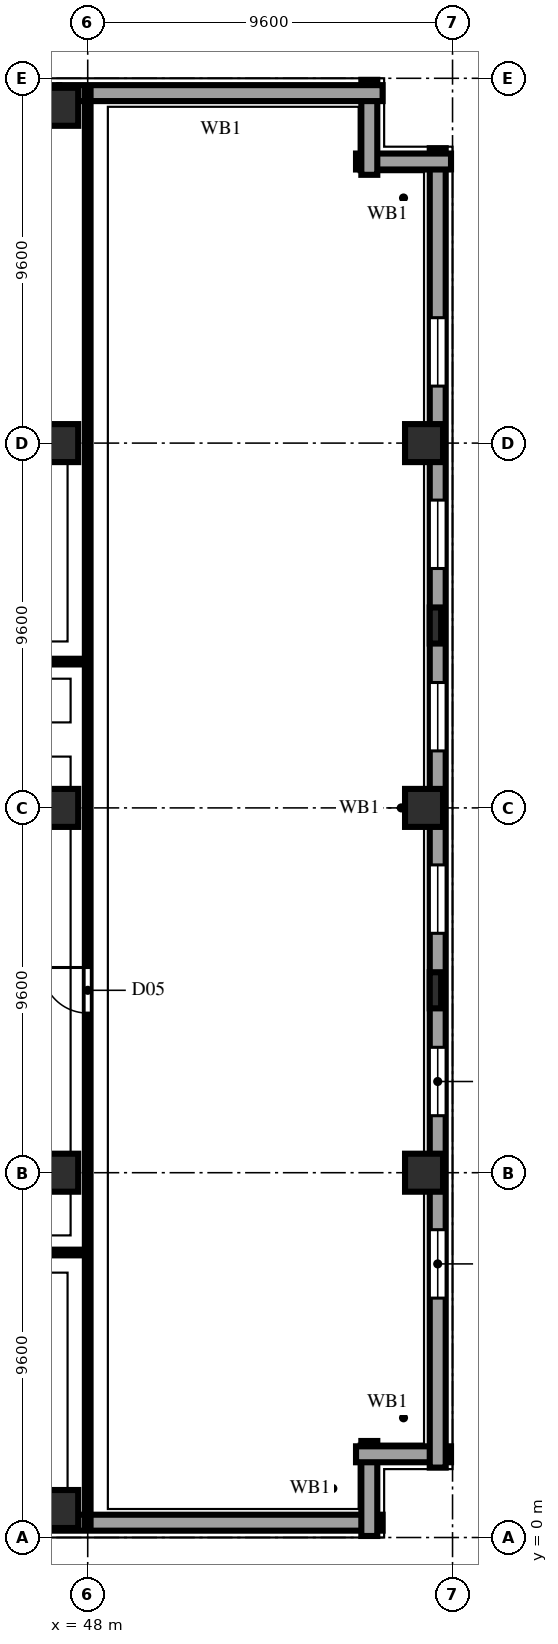
"""IFC4 building model, lengths in metres.
Left out: names, types, materials, properties, quantities, classifications, styles, units other than length and angle.
Written with IfcOpenShell. Run it as: python <this file> out.ifc"""

import sys

from ifc_helpers import new_model, si_unit, direction, frame, frame_2d, origin, origin_2d, place, context, subcontext, project, spatial, rectangle, extrude, element, fill, save


model = new_model("IFC4")
c1 = context("Model", 3, precision=1e-05, world=origin(), true_north=direction((0.0, 1.0)))
c2 = subcontext(c1, "Body", "Model", "MODEL_VIEW")
j1 = project(units=[si_unit("LENGTHUNIT", "METRE"), si_unit("PLANEANGLEUNIT", "RADIAN")], contexts=[c1])
p1 = place(None, origin())
s1 = spatial("IfcSite", under=j1, at=p1, CompositionType="ELEMENT")
p2 = place(p1, origin())
s2 = spatial("IfcBuilding", under=s1, at=p2, CompositionType="ELEMENT")
p3 = place(p2, frame((0.0, 0.0, 116.6)))
s3 = spatial("IfcBuildingStorey", under=s2, at=p3, CompositionType="ELEMENT", Elevation=116.6)
for number, where, z_axis, x_axis in (
    (1, (47.25, 0.75, 0.0), (0.0, 0.0, 1.0), (1.0, 0.0, 0.0)),
    (2, (47.25, 9.6, 0.0), (0.0, 0.0, 1.0), (1.0, 0.0, 0.0)),
    (3, (47.25, 19.2, 0.0), (0.0, 0.0, 1.0), (1.0, 0.0, 0.0)),
    (4, (47.25, 28.8, 0.0), (0.0, 0.0, 1.0), (1.0, 0.0, 0.0)),
    (5, (47.25, 37.65, 0.0), (0.0, 0.0, 1.0), (1.0, 0.0, 0.0)),
    (6, (56.85, 9.6, 0.0), (0.0, 0.0, 1.0), (1.0, 0.0, 0.0)),
    (7, (56.85, 19.2, 0.0), (0.0, 0.0, 1.0), (1.0, 0.0, 0.0)),
    (8, (56.85, 28.8, 0.0), (0.0, 0.0, 1.0), (1.0, 0.0, 0.0)),
):
    element("IfcColumn", number, at=place(p3, frame(where, z_axis=z_axis, x_axis=x_axis)), inside=s3, PredefinedType="COLUMN", context=c2, shape_type="SweptSolid", body=[
        extrude(rectangle(XDim=1.0, YDim=1.0, at=origin_2d()), origin(), (0.0, 0.0, 1.0), 3.8),
    ])
for number, where, z_axis, x_axis in (
    (9, (57.15, 14.4, 0.0), (0.0, 0.0, 1.0), (0.0, 1.0, 0.0)),
    (10, (57.15, 24.0, 0.0), (0.0, 0.0, 1.0), (0.0, 1.0, 0.0)),
):
    element("IfcColumn", number, at=place(p3, frame(where, z_axis=z_axis, x_axis=x_axis)), inside=s3, PredefinedType="PILASTER", context=c2, shape_type="SweptSolid", body=[
        extrude(rectangle(XDim=0.95, YDim=0.3, at=origin_2d()), origin(), (0.0, 0.0, 1.0), 3.8),
    ])
p4 = place(p3, frame((1.84, 0.39, 0.0), z_axis=(0.0, 0.0, 1.0), x_axis=(1.0, 0.0, 0.0)))
e11 = element("IfcWall", 11, at=p4, inside=s3, PredefinedType="SOLIDWALL", context=c2, shape_type="SweptSolid", body=[
    extrude(rectangle(XDim=53.92, YDim=0.42, at=frame_2d((26.96, 0.0))), origin(), (0.0, 0.0, 1.0), 3.54),
])
p5 = place(p4, frame((4.16, 0.0, 0.85)))
e12 = element("IfcOpeningElement", 12, at=p5, cuts=e11, PredefinedType="OPENING", context=c2, shape_type="SweptSolid", body=[
    extrude(rectangle(XDim=2.4, YDim=1.85, at=frame_2d((1.2, 0.925))), frame((0.0, 0.222, 0.0), z_axis=(0.0, -1.0, 0.0), x_axis=(1.0, 0.0, 0.0)), (0.0, 0.0, 1.0), 0.444),
])
p6 = place(p4, frame((8.96, 0.0, 0.85)))
e13 = element("IfcOpeningElement", 13, at=p6, cuts=e11, PredefinedType="OPENING", context=c2, shape_type="SweptSolid", body=[
    extrude(rectangle(XDim=2.4, YDim=1.85, at=frame_2d((1.2, 0.925))), frame((0.0, 0.222, 0.0), z_axis=(0.0, -1.0, 0.0), x_axis=(1.0, 0.0, 0.0)), (0.0, 0.0, 1.0), 0.444),
])
p7 = place(p4, frame((13.76, 0.0, 0.85)))
e14 = element("IfcOpeningElement", 14, at=p7, cuts=e11, PredefinedType="OPENING", context=c2, shape_type="SweptSolid", body=[
    extrude(rectangle(XDim=2.4, YDim=1.85, at=frame_2d((1.2, 0.925))), frame((0.0, 0.222, 0.0), z_axis=(0.0, -1.0, 0.0), x_axis=(1.0, 0.0, 0.0)), (0.0, 0.0, 1.0), 0.444),
])
p8 = place(p4, frame((18.56, 0.0, 0.85)))
e15 = element("IfcOpeningElement", 15, at=p8, cuts=e11, PredefinedType="OPENING", context=c2, shape_type="SweptSolid", body=[
    extrude(rectangle(XDim=2.4, YDim=1.85, at=frame_2d((1.2, 0.925))), frame((0.0, 0.222, 0.0), z_axis=(0.0, -1.0, 0.0), x_axis=(1.0, 0.0, 0.0)), (0.0, 0.0, 1.0), 0.444),
])
p9 = place(p4, frame((23.36, 0.0, 0.85)))
e16 = element("IfcOpeningElement", 16, at=p9, cuts=e11, PredefinedType="OPENING", context=c2, shape_type="SweptSolid", body=[
    extrude(rectangle(XDim=2.4, YDim=1.85, at=frame_2d((1.2, 0.925))), frame((0.0, 0.222, 0.0), z_axis=(0.0, -1.0, 0.0), x_axis=(1.0, 0.0, 0.0)), (0.0, 0.0, 1.0), 0.444),
])
p10 = place(p4, frame((28.16, 0.0, 0.85)))
e17 = element("IfcOpeningElement", 17, at=p10, cuts=e11, PredefinedType="OPENING", context=c2, shape_type="SweptSolid", body=[
    extrude(rectangle(XDim=2.4, YDim=1.85, at=frame_2d((1.2, 0.925))), frame((0.0, 0.222, 0.0), z_axis=(0.0, -1.0, 0.0), x_axis=(1.0, 0.0, 0.0)), (0.0, 0.0, 1.0), 0.444),
])
for number, where, z_axis, x_axis in (
    (18, (55.41, 0.04, 0.0), (0.0, 0.0, 1.0), (0.0, 1.0, 0.0)),
    (19, (55.06, 2.19, 0.0), (0.0, 0.0, 1.0), (1.0, 0.0, 0.0)),
):
    element("IfcWall", number, at=place(p3, frame(where, z_axis=z_axis, x_axis=x_axis)), inside=s3, PredefinedType="SOLIDWALL", context=c2, shape_type="SweptSolid", body=[
        extrude(rectangle(XDim=2.5, YDim=0.42, at=frame_2d((1.25, 0.0))), origin(), (0.0, 0.0, 1.0), 3.54),
    ])
p11 = place(p3, frame((57.21, 1.84, 0.0), z_axis=(0.0, 0.0, 1.0), x_axis=(0.0, 1.0, 0.0)))
e20 = element("IfcWall", 20, at=p11, inside=s3, PredefinedType="SOLIDWALL", context=c2, shape_type="SweptSolid", body=[
    extrude(rectangle(XDim=34.72, YDim=0.42, at=frame_2d((17.36, 0.0))), origin(), (0.0, 0.0, 1.0), 3.54),
])
p12 = place(p11, frame((4.46, 0.0, 0.85)))
e21 = element("IfcOpeningElement", 21, at=p12, cuts=e20, PredefinedType="OPENING", context=c2, shape_type="SweptSolid", body=[
    extrude(rectangle(XDim=1.8, YDim=1.85, at=frame_2d((0.9, 0.925))), frame((0.0, 0.222, 0.0), z_axis=(0.0, -1.0, 0.0), x_axis=(1.0, 0.0, 0.0)), (0.0, 0.0, 1.0), 0.444),
])
p13 = place(p11, frame((9.26, 0.0, 0.85)))
e22 = element("IfcOpeningElement", 22, at=p13, cuts=e20, PredefinedType="OPENING", context=c2, shape_type="SweptSolid", body=[
    extrude(rectangle(XDim=1.8, YDim=1.85, at=frame_2d((0.9, 0.925))), frame((0.0, 0.222, 0.0), z_axis=(0.0, -1.0, 0.0), x_axis=(1.0, 0.0, 0.0)), (0.0, 0.0, 1.0), 0.444),
])
p14 = place(p11, frame((14.06, 0.0, 0.85)))
e23 = element("IfcOpeningElement", 23, at=p14, cuts=e20, PredefinedType="OPENING", context=c2, shape_type="SweptSolid", body=[
    extrude(rectangle(XDim=1.8, YDim=1.85, at=frame_2d((0.9, 0.925))), frame((0.0, 0.222, 0.0), z_axis=(0.0, -1.0, 0.0), x_axis=(1.0, 0.0, 0.0)), (0.0, 0.0, 1.0), 0.444),
])
p15 = place(p11, frame((18.86, 0.0, 0.85)))
e24 = element("IfcOpeningElement", 24, at=p15, cuts=e20, PredefinedType="OPENING", context=c2, shape_type="SweptSolid", body=[
    extrude(rectangle(XDim=1.8, YDim=1.85, at=frame_2d((0.9, 0.925))), frame((0.0, 0.222, 0.0), z_axis=(0.0, -1.0, 0.0), x_axis=(1.0, 0.0, 0.0)), (0.0, 0.0, 1.0), 0.444),
])
p16 = place(p11, frame((23.66, 0.0, 0.85)))
e25 = element("IfcOpeningElement", 25, at=p16, cuts=e20, PredefinedType="OPENING", context=c2, shape_type="SweptSolid", body=[
    extrude(rectangle(XDim=1.8, YDim=1.85, at=frame_2d((0.9, 0.925))), frame((0.0, 0.222, 0.0), z_axis=(0.0, -1.0, 0.0), x_axis=(1.0, 0.0, 0.0)), (0.0, 0.0, 1.0), 0.444),
])
p17 = place(p11, frame((28.46, 0.0, 0.85)))
e26 = element("IfcOpeningElement", 26, at=p17, cuts=e20, PredefinedType="OPENING", context=c2, shape_type="SweptSolid", body=[
    extrude(rectangle(XDim=1.8, YDim=1.85, at=frame_2d((0.9, 0.925))), frame((0.0, 0.222, 0.0), z_axis=(0.0, -1.0, 0.0), x_axis=(1.0, 0.0, 0.0)), (0.0, 0.0, 1.0), 0.444),
])
for number, where, z_axis, x_axis in (
    (27, (57.56, 36.21, 0.0), (0.0, 0.0, 1.0), (-1.0, 0.0, 0.0)),
    (28, (55.41, 35.86, 0.0), (0.0, 0.0, 1.0), (0.0, 1.0, 0.0)),
):
    element("IfcWall", number, at=place(p3, frame(where, z_axis=z_axis, x_axis=x_axis)), inside=s3, PredefinedType="SOLIDWALL", context=c2, shape_type="SweptSolid", body=[
        extrude(rectangle(XDim=2.5, YDim=0.42, at=frame_2d((1.25, 0.0))), origin(), (0.0, 0.0, 1.0), 3.54),
    ])
p18 = place(p3, frame((55.76, 38.01, 0.0), z_axis=(0.0, 0.0, 1.0), x_axis=(-1.0, 0.0, 0.0)))
e29 = element("IfcWall", 29, at=p18, inside=s3, PredefinedType="SOLIDWALL", context=c2, shape_type="SweptSolid", body=[
    extrude(rectangle(XDim=8.51, YDim=0.42, at=frame_2d((4.255, 0.0))), origin(), (0.0, 0.0, 1.0), 3.54),
])
p19 = place(p3, frame((0.22, 7.5, 0.0), z_axis=(0.0, 0.0, 1.0), x_axis=(1.0, 0.0, 0.0)))
e30 = element("IfcWall", 30, at=p19, inside=s3, PredefinedType="PARTITIONING", context=c2, shape_type="SweptSolid", body=[
    extrude(rectangle(XDim=47.78, YDim=0.15, at=frame_2d((23.89, 0.0))), origin(), (0.0, 0.0, 1.0), 3.54),
])
p20 = place(p19, frame((13.68, 0.0, 0.0)))
e31 = element("IfcOpeningElement", 31, at=p20, cuts=e30, PredefinedType="OPENING", context=c2, shape_type="SweptSolid", body=[
    extrude(rectangle(XDim=1.0, YDim=2.2, at=frame_2d((0.5, 1.1))), frame((0.0, 0.087, 0.0), z_axis=(0.0, -1.0, 0.0), x_axis=(1.0, 0.0, 0.0)), (0.0, 0.0, 1.0), 0.174),
])
p21 = place(p19, frame((41.63, 0.0, 0.0)))
e32 = element("IfcOpeningElement", 32, at=p21, cuts=e30, PredefinedType="OPENING", context=c2, shape_type="SweptSolid", body=[
    extrude(rectangle(XDim=1.0, YDim=2.2, at=frame_2d((0.5, 1.1))), frame((0.0, 0.087, 0.0), z_axis=(0.0, -1.0, 0.0), x_axis=(1.0, 0.0, 0.0)), (0.0, 0.0, 1.0), 0.174),
])
p22 = place(p3, frame((48.0, 0.22, 0.0), z_axis=(0.0, 0.0, 1.0), x_axis=(0.0, 1.0, 0.0)))
e33 = element("IfcWall", 33, at=p22, inside=s3, PredefinedType="PARTITIONING", context=c2, shape_type="SweptSolid", body=[
    extrude(rectangle(XDim=37.96, YDim=0.15, at=frame_2d((18.98, 0.0))), origin(), (0.0, 0.0, 1.0), 3.54),
])
p23 = place(p22, frame((13.58, 0.0, 0.0)))
e34 = element("IfcOpeningElement", 34, at=p23, cuts=e33, PredefinedType="OPENING", context=c2, shape_type="SweptSolid", body=[
    extrude(rectangle(XDim=1.2, YDim=2.2, at=frame_2d((0.6, 1.1))), frame((0.0, 0.087, 0.0), z_axis=(0.0, -1.0, 0.0), x_axis=(1.0, 0.0, 0.0)), (0.0, 0.0, 1.0), 0.174),
])
p24 = place(p3, frame((38.4, 23.05, 0.0), z_axis=(0.0, 0.0, 1.0), x_axis=(1.0, 0.0, 0.0)))
e35 = element("IfcWall", 35, at=p24, inside=s3, PredefinedType="PARTITIONING", context=c2, shape_type="SweptSolid", body=[
    extrude(rectangle(XDim=9.52, YDim=0.15, at=frame_2d((4.76, 0.0))), origin(), (0.0, 0.0, 1.0), 3.54),
])
p25 = place(p24, frame((3.6, 0.0, 0.0)))
e36 = element("IfcOpeningElement", 36, at=p25, cuts=e35, PredefinedType="OPENING", context=c2, shape_type="SweptSolid", body=[
    extrude(rectangle(XDim=1.2, YDim=2.2, at=frame_2d((0.6, 1.1))), frame((0.0, 0.087, 0.0), z_axis=(0.0, -1.0, 0.0), x_axis=(1.0, 0.0, 0.0)), (0.0, 0.0, 1.0), 0.174),
])
p26 = place(p3, frame((47.25, 38.01, 0.0), z_axis=(0.0, 0.0, 1.0), x_axis=(-1.0, 0.0, 0.0)))
e37 = element("IfcWall", 37, at=p26, inside=s3, PredefinedType="SOLIDWALL", context=c2, shape_type="SweptSolid", body=[
    extrude(rectangle(XDim=1.25, YDim=0.42, at=frame_2d((0.625, 0.0))), origin(), (0.0, 0.0, 1.0), 2.14),
])
p27 = place(p12, origin())
e38 = element("IfcWindow", 38, at=p27, inside=s3, PartitioningType="DOUBLE_PANEL_VERTICAL", PredefinedType="WINDOW", context=c2, shape_type="SweptSolid", body=[
    extrude(rectangle(XDim=1.8, YDim=1.85, at=frame_2d((0.9, 0.925))), frame((0.0, 0.11, 0.0), z_axis=(0.0, -1.0, 0.0), x_axis=(1.0, 0.0, 0.0)), (0.0, 0.0, 1.0), 0.06),
])
fill(e21, e38)
p28 = place(p13, origin())
e39 = element("IfcWindow", 39, at=p28, inside=s3, PartitioningType="DOUBLE_PANEL_VERTICAL", PredefinedType="WINDOW", context=c2, shape_type="SweptSolid", body=[
    extrude(rectangle(XDim=1.8, YDim=1.85, at=frame_2d((0.9, 0.925))), frame((0.0, 0.11, 0.0), z_axis=(0.0, -1.0, 0.0), x_axis=(1.0, 0.0, 0.0)), (0.0, 0.0, 1.0), 0.06),
])
fill(e22, e39)
p29 = place(p14, origin())
e40 = element("IfcWindow", 40, at=p29, inside=s3, PartitioningType="DOUBLE_PANEL_VERTICAL", PredefinedType="WINDOW", context=c2, shape_type="SweptSolid", body=[
    extrude(rectangle(XDim=1.8, YDim=1.85, at=frame_2d((0.9, 0.925))), frame((0.0, 0.11, 0.0), z_axis=(0.0, -1.0, 0.0), x_axis=(1.0, 0.0, 0.0)), (0.0, 0.0, 1.0), 0.06),
])
fill(e23, e40)
p30 = place(p15, origin())
e41 = element("IfcWindow", 41, at=p30, inside=s3, PartitioningType="DOUBLE_PANEL_VERTICAL", PredefinedType="WINDOW", context=c2, shape_type="SweptSolid", body=[
    extrude(rectangle(XDim=1.8, YDim=1.85, at=frame_2d((0.9, 0.925))), frame((0.0, 0.11, 0.0), z_axis=(0.0, -1.0, 0.0), x_axis=(1.0, 0.0, 0.0)), (0.0, 0.0, 1.0), 0.06),
])
fill(e24, e41)
p31 = place(p16, origin())
e42 = element("IfcWindow", 42, at=p31, inside=s3, PartitioningType="DOUBLE_PANEL_VERTICAL", PredefinedType="WINDOW", context=c2, shape_type="SweptSolid", body=[
    extrude(rectangle(XDim=1.8, YDim=1.85, at=frame_2d((0.9, 0.925))), frame((0.0, 0.11, 0.0), z_axis=(0.0, -1.0, 0.0), x_axis=(1.0, 0.0, 0.0)), (0.0, 0.0, 1.0), 0.06),
])
fill(e25, e42)
p32 = place(p17, origin())
e43 = element("IfcWindow", 43, at=p32, inside=s3, PartitioningType="DOUBLE_PANEL_VERTICAL", PredefinedType="WINDOW", context=c2, shape_type="SweptSolid", body=[
    extrude(rectangle(XDim=1.8, YDim=1.85, at=frame_2d((0.9, 0.925))), frame((0.0, 0.11, 0.0), z_axis=(0.0, -1.0, 0.0), x_axis=(1.0, 0.0, 0.0)), (0.0, 0.0, 1.0), 0.06),
])
fill(e26, e43)
p33 = place(p23, origin())
e44 = element("IfcDoor", 44, at=p33, inside=s3, OperationType="SINGLE_SWING_RIGHT", PredefinedType="DOOR", context=c2, shape_type="SweptSolid", body=[
    extrude(rectangle(XDim=1.2, YDim=2.2, at=frame_2d((0.6, 1.1))), frame((0.0, 0.025, 0.0), z_axis=(0.0, -1.0, 0.0), x_axis=(1.0, 0.0, 0.0)), (0.0, 0.0, 1.0), 0.05),
])
fill(e34, e44)
save(model, sys.argv[1])
